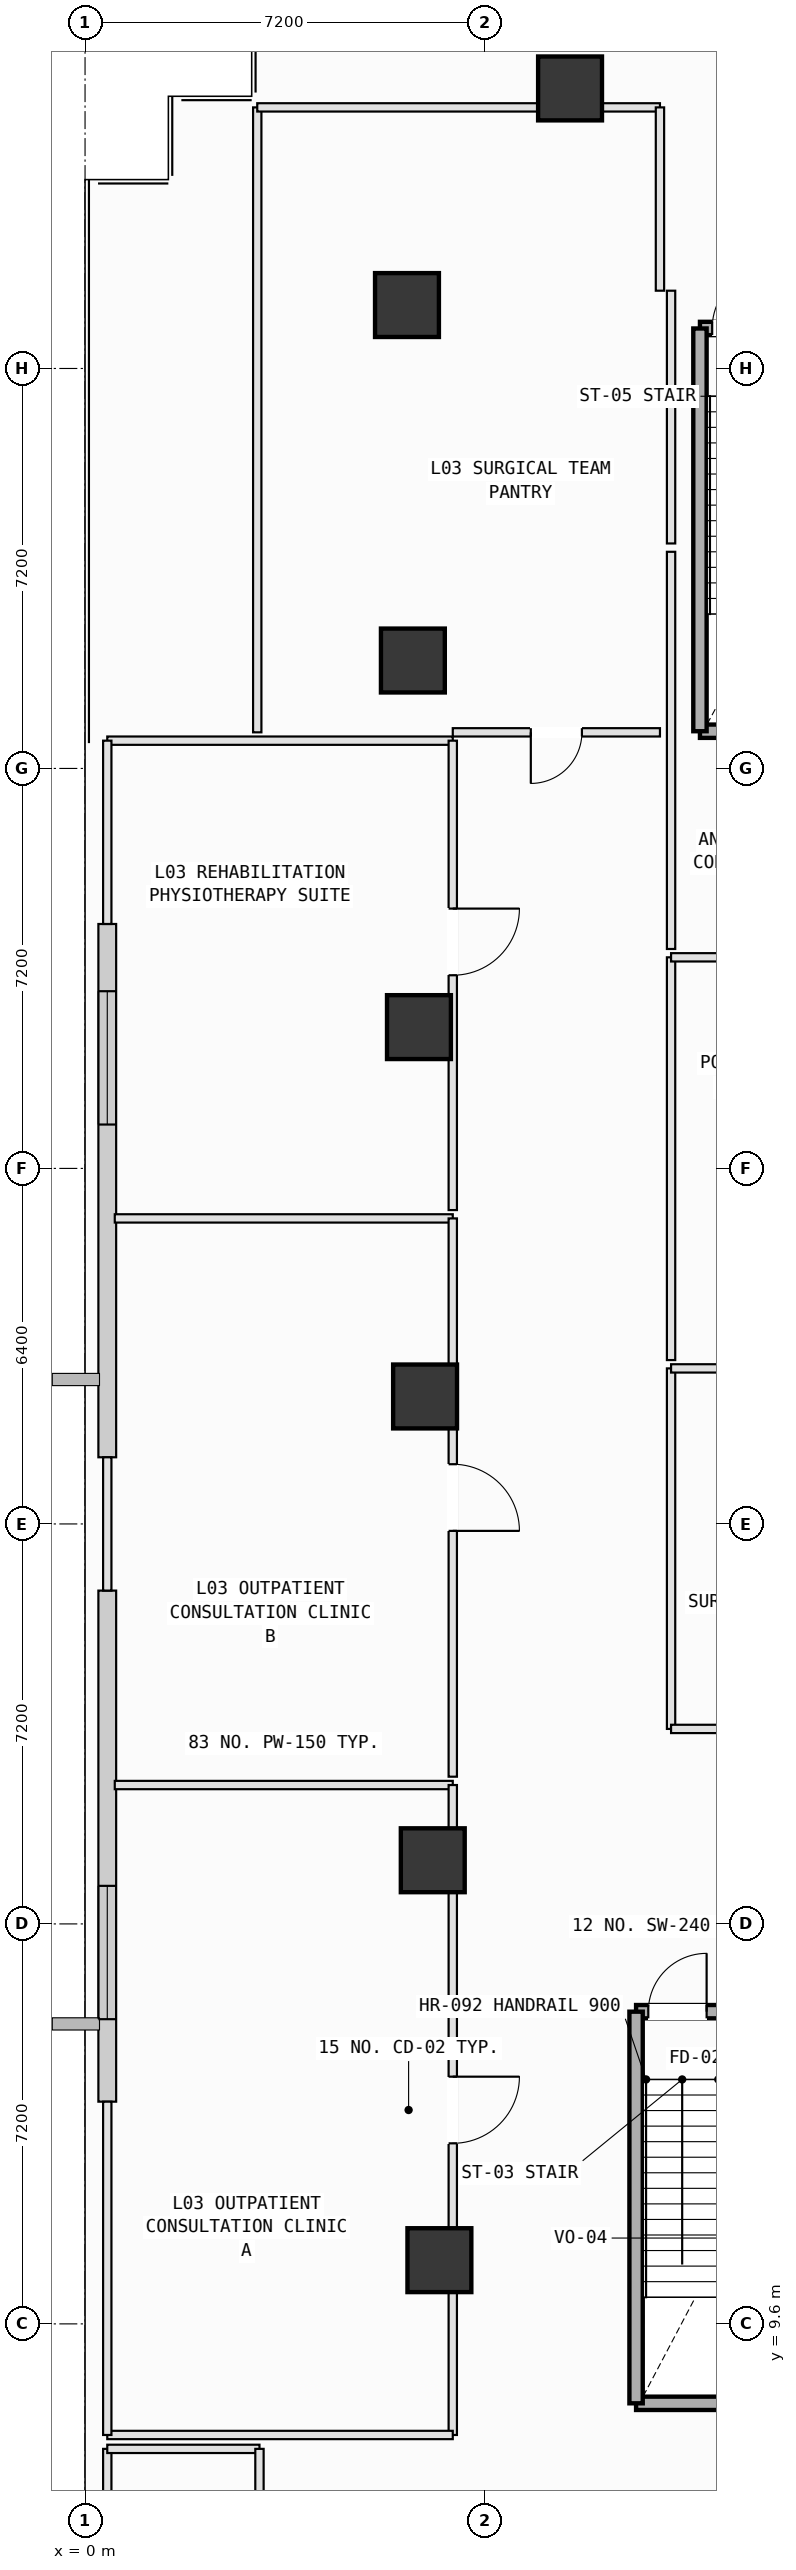
"""IFC4 building model, lengths in metres.
Left out: names, types, materials, properties, quantities, classifications, styles, units other than length and angle.
Written with IfcOpenShell. Run it as: python <this file> out.ifc"""

import sys

from ifc_helpers import new_model, si_unit, direction, frame, frame_2d, origin, origin_2d, place, context, subcontext, project, spatial, rectangle, extrude, element, fill, save


model = new_model("IFC4")
c1 = context("Model", 3, precision=1e-05, world=origin(), true_north=direction((0.0, 1.0)))
c2 = subcontext(c1, "Body", "Model", "MODEL_VIEW")
j1 = project(units=[si_unit("LENGTHUNIT", "METRE"), si_unit("PLANEANGLEUNIT", "RADIAN")], contexts=[c1])
p1 = place(None, origin())
s1 = spatial("IfcSite", under=j1, at=p1, CompositionType="ELEMENT")
p2 = place(p1, origin())
s2 = spatial("IfcBuilding", under=s1, at=p2, CompositionType="ELEMENT")
p3 = place(p2, frame((0.0, 0.0, 16.2)))
s3 = spatial("IfcBuildingStorey", under=s2, at=p3, CompositionType="ELEMENT", Elevation=16.2)
for number, where, z_axis, x_axis in (
    (1, (8.731, 49.841, 0.0), (0.0, 0.0, 1.0), (1.0, 0.0, 0.0)),
    (2, (5.796, 45.942, 0.0), (0.0, 0.0, 1.0), (1.0, 0.0, 0.0)),
    (3, (5.902, 39.543, 0.0), (0.0, 0.0, 1.0), (1.0, 0.0, 0.0)),
    (4, (6.011, 32.944, 0.0), (0.0, 0.0, 1.0), (1.0, 0.0, 0.0)),
    (5, (6.121, 26.295, 0.0), (0.0, 0.0, 1.0), (1.0, 0.0, 0.0)),
    (6, (6.26, 17.946, 0.0), (0.0, 0.0, 1.0), (1.0, 0.0, 0.0)),
    (7, (6.379, 10.747, 0.0), (0.0, 0.0, 1.0), (1.0, 0.0, 0.0)),
):
    element("IfcColumn", number, at=place(p3, frame(where, z_axis=z_axis, x_axis=x_axis)), inside=s3, PredefinedType="COLUMN", context=c2, shape_type="SweptSolid", body=[
        extrude(rectangle(XDim=1.15, YDim=1.15, at=origin_2d()), origin(), (0.0, 0.0, 1.0), 5.4),
    ])
p4 = place(p3, frame((0.4, 13.6, 0.0), z_axis=(0.0, 0.0, 1.0), x_axis=(0.0, 1.0, 0.0)))
e8 = element("IfcWall", 8, at=p4, inside=s3, PredefinedType="SOLIDWALL", context=c2, shape_type="SweptSolid", body=[
    extrude(rectangle(XDim=9.2, YDim=0.32, at=frame_2d((4.6, 0.0))), origin(), (0.0, 0.0, 1.0), 4.23),
])
p5 = place(p4, frame((1.485, 0.0, 0.8)))
e9 = element("IfcOpeningElement", 9, at=p5, cuts=e8, PredefinedType="OPENING", context=c2, shape_type="SweptSolid", body=[
    extrude(rectangle(XDim=2.4, YDim=2.2, at=frame_2d((1.2, 1.1))), frame((0.0, 0.17, 0.0), z_axis=(0.0, -1.0, 0.0), x_axis=(1.0, 0.0, 0.0)), (0.0, 0.0, 1.0), 0.34),
])
p6 = place(p3, frame((0.4, 25.2, 0.0), z_axis=(0.0, 0.0, 1.0), x_axis=(0.0, 1.0, 0.0)))
e10 = element("IfcWall", 10, at=p6, inside=s3, PredefinedType="SOLIDWALL", context=c2, shape_type="SweptSolid", body=[
    extrude(rectangle(XDim=9.6, YDim=0.32, at=frame_2d((4.8, 0.0))), origin(), (0.0, 0.0, 1.0), 4.23),
])
p7 = place(p6, frame((5.99, 0.0, 0.8)))
e11 = element("IfcOpeningElement", 11, at=p7, cuts=e10, PredefinedType="OPENING", context=c2, shape_type="SweptSolid", body=[
    extrude(rectangle(XDim=2.4, YDim=2.2, at=frame_2d((1.2, 1.1))), frame((0.0, 0.17, 0.0), z_axis=(0.0, -1.0, 0.0), x_axis=(1.0, 0.0, 0.0)), (0.0, 0.0, 1.0), 0.34),
])
p8 = place(p3, frame((9.92, 15.22, 0.0), z_axis=(0.0, 0.0, 1.0), x_axis=(1.0, 0.0, 0.0)))
e12 = element("IfcWall", 12, at=p8, inside=s3, PredefinedType="SOLIDWALL", context=c2, shape_type="SweptSolid", body=[
    extrude(rectangle(XDim=3.26, YDim=0.24, at=frame_2d((1.63, 0.0))), origin(), (0.0, 0.0, 1.0), 5.15),
])
p9 = place(p8, frame((0.22, 0.0, 0.0)))
e13 = element("IfcOpeningElement", 13, at=p9, cuts=e12, PredefinedType="OPENING", context=c2, shape_type="SweptSolid", body=[
    extrude(rectangle(XDim=1.05, YDim=2.15, at=frame_2d((0.525, 1.075))), frame((0.0, 0.13, 0.0), z_axis=(0.0, -1.0, 0.0), x_axis=(1.0, 0.0, 0.0)), (0.0, 0.0, 1.0), 0.26),
])
p10 = place(p3, frame((13.18, 8.17, 0.0), z_axis=(0.0, 0.0, 1.0), x_axis=(-1.0, 0.0, 0.0)))
e14 = element("IfcWall", 14, at=p10, inside=s3, PredefinedType="SOLIDWALL", context=c2, shape_type="SweptSolid", body=[
    extrude(rectangle(XDim=3.26, YDim=0.24, at=frame_2d((1.63, 0.0))), origin(), (0.0, 0.0, 1.0), 5.15),
])
p11 = place(p3, frame((9.92, 8.17, 0.0), z_axis=(0.0, 0.0, 1.0), x_axis=(0.0, 1.0, 0.0)))
e15 = element("IfcWall", 15, at=p11, inside=s3, PredefinedType="SOLIDWALL", context=c2, shape_type="SweptSolid", body=[
    extrude(rectangle(XDim=7.05, YDim=0.24, at=frame_2d((3.525, 0.0))), origin(), (0.0, 0.0, 1.0), 5.15),
])
p12 = place(p3, frame((11.07, 45.52, 0.0), z_axis=(0.0, 0.0, 1.0), x_axis=(1.0, 0.0, 0.0)))
e16 = element("IfcWall", 16, at=p12, inside=s3, PredefinedType="SOLIDWALL", context=c2, shape_type="SweptSolid", body=[
    extrude(rectangle(XDim=3.46, YDim=0.24, at=frame_2d((1.73, 0.0))), origin(), (0.0, 0.0, 1.0), 5.15),
])
p13 = place(p12, frame((0.22, 0.0, 0.0)))
e17 = element("IfcOpeningElement", 17, at=p13, cuts=e16, PredefinedType="OPENING", context=c2, shape_type="SweptSolid", body=[
    extrude(rectangle(XDim=1.1, YDim=2.15, at=frame_2d((0.55, 1.075))), frame((0.0, 0.13, 0.0), z_axis=(0.0, -1.0, 0.0), x_axis=(1.0, 0.0, 0.0)), (0.0, 0.0, 1.0), 0.26),
])
p14 = place(p3, frame((14.53, 38.27, 0.0), z_axis=(0.0, 0.0, 1.0), x_axis=(-1.0, 0.0, 0.0)))
e18 = element("IfcWall", 18, at=p14, inside=s3, PredefinedType="SOLIDWALL", context=c2, shape_type="SweptSolid", body=[
    extrude(rectangle(XDim=3.46, YDim=0.24, at=frame_2d((1.73, 0.0))), origin(), (0.0, 0.0, 1.0), 5.15),
])
p15 = place(p3, frame((11.07, 38.27, 0.0), z_axis=(0.0, 0.0, 1.0), x_axis=(0.0, 1.0, 0.0)))
e19 = element("IfcWall", 19, at=p15, inside=s3, PredefinedType="SOLIDWALL", context=c2, shape_type="SweptSolid", body=[
    extrude(rectangle(XDim=7.25, YDim=0.24, at=frame_2d((3.625, 0.0))), origin(), (0.0, 0.0, 1.0), 5.15),
])
p16 = place(p3, frame((0.535, 19.3, 0.0), z_axis=(0.0, 0.0, 1.0), x_axis=(1.0, 0.0, 0.0)))
e20 = element("IfcWall", 20, at=p16, inside=s3, PredefinedType="PARTITIONING", context=c2, shape_type="SweptSolid", body=[
    extrude(rectangle(XDim=6.085, YDim=0.15, at=frame_2d((3.042, 0.0))), origin(), (0.0, 0.0, 1.0), 5.15),
])
p17 = place(p3, frame((6.62, 19.3, 0.0), z_axis=(0.0, 0.0, 1.0), x_axis=(0.0, -1.0, 0.0)))
e21 = element("IfcWall", 21, at=p17, inside=s3, PredefinedType="PARTITIONING", context=c2, shape_type="SweptSolid", body=[
    extrude(rectangle(XDim=11.7, YDim=0.15, at=frame_2d((5.85, 0.0))), origin(), (0.0, 0.0, 1.0), 4.235),
])
p18 = place(p17, frame((5.25, 0.0, 0.0)))
e22 = element("IfcOpeningElement", 22, at=p18, cuts=e21, PredefinedType="OPENING", context=c2, shape_type="SweptSolid", body=[
    extrude(rectangle(XDim=1.2, YDim=2.15, at=frame_2d((0.6, 1.075))), frame((0.0, 0.085, 0.0), z_axis=(0.0, -1.0, 0.0), x_axis=(1.0, 0.0, 0.0)), (0.0, 0.0, 1.0), 0.17),
])
p19 = place(p3, frame((6.62, 7.6, 0.0), z_axis=(0.0, 0.0, 1.0), x_axis=(-1.0, 0.0, 0.0)))
e23 = element("IfcWall", 23, at=p19, inside=s3, PredefinedType="PARTITIONING", context=c2, shape_type="SweptSolid", body=[
    extrude(rectangle(XDim=6.22, YDim=0.15, at=frame_2d((3.11, 0.0))), origin(), (0.0, 0.0, 1.0), 5.15),
])
p20 = place(p3, frame((0.4, 7.6, 0.0), z_axis=(0.0, 0.0, 1.0), x_axis=(0.0, 1.0, 0.0)))
e24 = element("IfcWall", 24, at=p20, inside=s3, PredefinedType="PARTITIONING", context=c2, shape_type="SweptSolid", body=[
    extrude(rectangle(XDim=6.0, YDim=0.15, at=frame_2d((3.0, 0.0))), origin(), (0.0, 0.0, 1.0), 5.15),
])
p21 = place(p3, frame((0.535, 29.5, 0.0), z_axis=(0.0, 0.0, 1.0), x_axis=(1.0, 0.0, 0.0)))
e25 = element("IfcWall", 25, at=p21, inside=s3, PredefinedType="PARTITIONING", context=c2, shape_type="SweptSolid", body=[
    extrude(rectangle(XDim=6.085, YDim=0.15, at=frame_2d((3.042, 0.0))), origin(), (0.0, 0.0, 1.0), 5.15),
])
p22 = place(p3, frame((6.62, 29.5, 0.0), z_axis=(0.0, 0.0, 1.0), x_axis=(0.0, -1.0, 0.0)))
e26 = element("IfcWall", 26, at=p22, inside=s3, PredefinedType="PARTITIONING", context=c2, shape_type="SweptSolid", body=[
    extrude(rectangle(XDim=10.05, YDim=0.15, at=frame_2d((5.025, 0.0))), origin(), (0.0, 0.0, 1.0), 4.235),
])
p23 = place(p22, frame((4.425, 0.0, 0.0)))
e27 = element("IfcOpeningElement", 27, at=p23, cuts=e26, PredefinedType="OPENING", context=c2, shape_type="SweptSolid", body=[
    extrude(rectangle(XDim=1.2, YDim=2.15, at=frame_2d((0.6, 1.075))), frame((0.0, 0.085, 0.0), z_axis=(0.0, -1.0, 0.0), x_axis=(1.0, 0.0, 0.0)), (0.0, 0.0, 1.0), 0.17),
])
p24 = place(p3, frame((0.4, 22.8, 0.0), z_axis=(0.0, 0.0, 1.0), x_axis=(0.0, 1.0, 0.0)))
e28 = element("IfcWall", 28, at=p24, inside=s3, PredefinedType="PARTITIONING", context=c2, shape_type="SweptSolid", body=[
    extrude(rectangle(XDim=2.4, YDim=0.15, at=frame_2d((1.2, 0.0))), origin(), (0.0, 0.0, 1.0), 5.15),
])
p25 = place(p3, frame((0.4, 38.1, 0.0), z_axis=(0.0, 0.0, 1.0), x_axis=(1.0, 0.0, 0.0)))
e29 = element("IfcWall", 29, at=p25, inside=s3, PredefinedType="PARTITIONING", context=c2, shape_type="SweptSolid", body=[
    extrude(rectangle(XDim=6.22, YDim=0.15, at=frame_2d((3.11, 0.0))), origin(), (0.0, 0.0, 1.0), 5.15),
])
p26 = place(p3, frame((6.62, 38.1, 0.0), z_axis=(0.0, 0.0, 1.0), x_axis=(0.0, -1.0, 0.0)))
e30 = element("IfcWall", 30, at=p26, inside=s3, PredefinedType="PARTITIONING", context=c2, shape_type="SweptSolid", body=[
    extrude(rectangle(XDim=8.45, YDim=0.15, at=frame_2d((4.225, 0.0))), origin(), (0.0, 0.0, 1.0), 4.235),
])
p27 = place(p26, frame((3.023, 0.0, 0.0)))
e31 = element("IfcOpeningElement", 31, at=p27, cuts=e30, PredefinedType="OPENING", context=c2, shape_type="SweptSolid", body=[
    extrude(rectangle(XDim=1.2, YDim=2.15, at=frame_2d((0.6, 1.075))), frame((0.0, 0.085, 0.0), z_axis=(0.0, -1.0, 0.0), x_axis=(1.0, 0.0, 0.0)), (0.0, 0.0, 1.0), 0.17),
])
p28 = place(p3, frame((0.4, 34.8, 0.0), z_axis=(0.0, 0.0, 1.0), x_axis=(0.0, 1.0, 0.0)))
e32 = element("IfcWall", 32, at=p28, inside=s3, PredefinedType="PARTITIONING", context=c2, shape_type="SweptSolid", body=[
    extrude(rectangle(XDim=3.3, YDim=0.15, at=frame_2d((1.65, 0.0))), origin(), (0.0, 0.0, 1.0), 5.15),
])
p29 = place(p3, frame((0.4, 3.0, 0.0), z_axis=(0.0, 0.0, 1.0), x_axis=(0.0, 1.0, 0.0)))
e33 = element("IfcWall", 33, at=p29, inside=s3, PredefinedType="PARTITIONING", context=c2, shape_type="SweptSolid", body=[
    extrude(rectangle(XDim=4.35, YDim=0.15, at=frame_2d((2.175, 0.0))), origin(), (0.0, 0.0, 1.0), 5.15),
])
p30 = place(p3, frame((0.4, 7.35, 0.0), z_axis=(0.0, 0.0, 1.0), x_axis=(1.0, 0.0, 0.0)))
e34 = element("IfcWall", 34, at=p30, inside=s3, PredefinedType="PARTITIONING", context=c2, shape_type="SweptSolid", body=[
    extrude(rectangle(XDim=2.74, YDim=0.15, at=frame_2d((1.37, 0.0))), origin(), (0.0, 0.0, 1.0), 5.15),
])
p31 = place(p3, frame((3.14, 7.35, 0.0), z_axis=(0.0, 0.0, 1.0), x_axis=(0.0, -1.0, 0.0)))
e35 = element("IfcWall", 35, at=p31, inside=s3, PredefinedType="PARTITIONING", context=c2, shape_type="SweptSolid", body=[
    extrude(rectangle(XDim=2.256, YDim=0.15, at=frame_2d((1.128, 0.0))), origin(), (0.0, 0.0, 1.0), 5.15),
])
p32 = place(p3, frame((10.55, 20.31, 0.0), z_axis=(0.0, 0.0, 1.0), x_axis=(0.0, 1.0, 0.0)))
e36 = element("IfcWall", 36, at=p32, inside=s3, PredefinedType="PARTITIONING", context=c2, shape_type="SweptSolid", body=[
    extrude(rectangle(XDim=6.49, YDim=0.15, at=frame_2d((3.245, 0.0))), origin(), (0.0, 0.0, 1.0), 5.15),
])
for number, where, z_axis, x_axis in (
    (37, (10.55, 26.8, 0.0), (0.0, 0.0, 1.0), (1.0, 0.0, 0.0)),
    (38, (15.14, 20.31, 0.0), (0.0, 0.0, 1.0), (-1.0, 0.0, 0.0)),
):
    element("IfcWall", number, at=place(p3, frame(where, z_axis=z_axis, x_axis=x_axis)), inside=s3, PredefinedType="PARTITIONING", context=c2, shape_type="SweptSolid", body=[
        extrude(rectangle(XDim=4.59, YDim=0.15, at=frame_2d((2.295, 0.0))), origin(), (0.0, 0.0, 1.0), 5.15),
    ])
p33 = place(p3, frame((10.55, 26.95, 0.0), z_axis=(0.0, 0.0, 1.0), x_axis=(0.0, 1.0, 0.0)))
e39 = element("IfcWall", 39, at=p33, inside=s3, PredefinedType="PARTITIONING", context=c2, shape_type="SweptSolid", body=[
    extrude(rectangle(XDim=7.25, YDim=0.15, at=frame_2d((3.625, 0.0))), origin(), (0.0, 0.0, 1.0), 5.15),
])
p34 = place(p3, frame((10.55, 34.2, 0.0), z_axis=(0.0, 0.0, 1.0), x_axis=(1.0, 0.0, 0.0)))
e40 = element("IfcWall", 40, at=p34, inside=s3, PredefinedType="PARTITIONING", context=c2, shape_type="SweptSolid", body=[
    extrude(rectangle(XDim=4.59, YDim=0.15, at=frame_2d((2.295, 0.0))), origin(), (0.0, 0.0, 1.0), 5.15),
])
p35 = place(p3, frame((10.55, 34.35, 0.0), z_axis=(0.0, 0.0, 1.0), x_axis=(0.0, 1.0, 0.0)))
e41 = element("IfcWall", 41, at=p35, inside=s3, PredefinedType="PARTITIONING", context=c2, shape_type="SweptSolid", body=[
    extrude(rectangle(XDim=7.15, YDim=0.15, at=frame_2d((3.575, 0.0))), origin(), (0.0, 0.0, 1.0), 5.15),
])
p36 = place(p3, frame((10.55, 41.65, 0.0), z_axis=(0.0, 0.0, 1.0), x_axis=(0.0, 1.0, 0.0)))
e42 = element("IfcWall", 42, at=p36, inside=s3, PredefinedType="PARTITIONING", context=c2, shape_type="SweptSolid", body=[
    extrude(rectangle(XDim=4.55, YDim=0.15, at=frame_2d((2.275, 0.0))), origin(), (0.0, 0.0, 1.0), 5.15),
])
p37 = place(p3, frame((10.35, 38.25, 0.0), z_axis=(0.0, 0.0, 1.0), x_axis=(-1.0, 0.0, 0.0)))
e43 = element("IfcWall", 43, at=p37, inside=s3, PredefinedType="PARTITIONING", context=c2, shape_type="SweptSolid", body=[
    extrude(rectangle(XDim=3.73, YDim=0.15, at=frame_2d((1.865, 0.0))), origin(), (0.0, 0.0, 1.0), 5.15),
])
p38 = place(p37, frame((1.405, 0.0, 0.0)))
e44 = element("IfcOpeningElement", 44, at=p38, cuts=e43, PredefinedType="OPENING", context=c2, shape_type="SweptSolid", body=[
    extrude(rectangle(XDim=0.92, YDim=2.1, at=frame_2d((0.46, 1.05))), frame((0.0, 0.085, 0.0), z_axis=(0.0, -1.0, 0.0), x_axis=(1.0, 0.0, 0.0)), (0.0, 0.0, 1.0), 0.17),
])
p39 = place(p3, frame((3.1, 38.25, 0.0), z_axis=(0.0, 0.0, 1.0), x_axis=(0.0, 1.0, 0.0)))
e45 = element("IfcWall", 45, at=p39, inside=s3, PredefinedType="PARTITIONING", context=c2, shape_type="SweptSolid", body=[
    extrude(rectangle(XDim=11.25, YDim=0.15, at=frame_2d((5.625, 0.0))), origin(), (0.0, 0.0, 1.0), 5.15),
])
p40 = place(p3, frame((3.1, 49.5, 0.0), z_axis=(0.0, 0.0, 1.0), x_axis=(1.0, 0.0, 0.0)))
e46 = element("IfcWall", 46, at=p40, inside=s3, PredefinedType="PARTITIONING", context=c2, shape_type="SweptSolid", body=[
    extrude(rectangle(XDim=7.25, YDim=0.15, at=frame_2d((3.625, 0.0))), origin(), (0.0, 0.0, 1.0), 4.235),
])
p41 = place(p3, frame((10.35, 49.5, 0.0), z_axis=(0.0, 0.0, 1.0), x_axis=(0.0, -1.0, 0.0)))
e47 = element("IfcWall", 47, at=p41, inside=s3, PredefinedType="PARTITIONING", context=c2, shape_type="SweptSolid", body=[
    extrude(rectangle(XDim=3.3, YDim=0.15, at=frame_2d((1.65, 0.0))), origin(), (0.0, 0.0, 1.0), 5.15),
])
p42 = place(p5, origin())
e48 = element("IfcWindow", 48, at=p42, inside=s3, PartitioningType="SINGLE_PANEL", PredefinedType="WINDOW", context=c2, shape_type="SweptSolid", body=[
    extrude(rectangle(XDim=2.4, YDim=2.2, at=frame_2d((1.2, 1.1))), frame((0.0, 0.03, 0.0), z_axis=(0.0, -1.0, 0.0), x_axis=(1.0, 0.0, 0.0)), (0.0, 0.0, 1.0), 0.06),
])
fill(e9, e48)
p43 = place(p7, origin())
e49 = element("IfcWindow", 49, at=p43, inside=s3, PartitioningType="SINGLE_PANEL", PredefinedType="WINDOW", context=c2, shape_type="SweptSolid", body=[
    extrude(rectangle(XDim=2.4, YDim=2.2, at=frame_2d((1.2, 1.1))), frame((0.0, 0.03, 0.0), z_axis=(0.0, -1.0, 0.0), x_axis=(1.0, 0.0, 0.0)), (0.0, 0.0, 1.0), 0.06),
])
fill(e11, e49)
p44 = place(p9, origin())
e50 = element("IfcDoor", 50, at=p44, inside=s3, OperationType="SINGLE_SWING_RIGHT", PredefinedType="DOOR", context=c2, shape_type="SweptSolid", body=[
    extrude(rectangle(XDim=1.05, YDim=2.15, at=frame_2d((0.525, 1.075))), frame((0.0, 0.025, 0.0), z_axis=(0.0, -1.0, 0.0), x_axis=(1.0, 0.0, 0.0)), (0.0, 0.0, 1.0), 0.05),
])
fill(e13, e50)
p45 = place(p13, origin())
e51 = element("IfcDoor", 51, at=p45, inside=s3, OperationType="SINGLE_SWING_RIGHT", PredefinedType="DOOR", context=c2, shape_type="SweptSolid", body=[
    extrude(rectangle(XDim=1.1, YDim=2.15, at=frame_2d((0.55, 1.075))), frame((0.0, 0.025, 0.0), z_axis=(0.0, -1.0, 0.0), x_axis=(1.0, 0.0, 0.0)), (0.0, 0.0, 1.0), 0.05),
])
fill(e17, e51)
p46 = place(p18, origin())
e52 = element("IfcDoor", 52, at=p46, inside=s3, OperationType="SINGLE_SWING_LEFT", PredefinedType="DOOR", context=c2, shape_type="SweptSolid", body=[
    extrude(rectangle(XDim=1.2, YDim=2.15, at=frame_2d((0.6, 1.075))), frame((0.0, 0.025, 0.0), z_axis=(0.0, -1.0, 0.0), x_axis=(1.0, 0.0, 0.0)), (0.0, 0.0, 1.0), 0.05),
])
fill(e22, e52)
p47 = place(p23, origin())
e53 = element("IfcDoor", 53, at=p47, inside=s3, OperationType="SINGLE_SWING_RIGHT", PredefinedType="DOOR", context=c2, shape_type="SweptSolid", body=[
    extrude(rectangle(XDim=1.2, YDim=2.15, at=frame_2d((0.6, 1.075))), frame((0.0, 0.025, 0.0), z_axis=(0.0, -1.0, 0.0), x_axis=(1.0, 0.0, 0.0)), (0.0, 0.0, 1.0), 0.05),
])
fill(e27, e53)
p48 = place(p27, origin())
e54 = element("IfcDoor", 54, at=p48, inside=s3, OperationType="SINGLE_SWING_LEFT", PredefinedType="DOOR", context=c2, shape_type="SweptSolid", body=[
    extrude(rectangle(XDim=1.2, YDim=2.15, at=frame_2d((0.6, 1.075))), frame((0.0, 0.025, 0.0), z_axis=(0.0, -1.0, 0.0), x_axis=(1.0, 0.0, 0.0)), (0.0, 0.0, 1.0), 0.05),
])
fill(e31, e54)
p49 = place(p38, origin())
e55 = element("IfcDoor", 55, at=p49, inside=s3, OperationType="SINGLE_SWING_RIGHT", PredefinedType="DOOR", context=c2, shape_type="SweptSolid", body=[
    extrude(rectangle(XDim=0.92, YDim=2.1, at=frame_2d((0.46, 1.05))), frame((0.0, 0.025, 0.0), z_axis=(0.0, -1.0, 0.0), x_axis=(1.0, 0.0, 0.0)), (0.0, 0.0, 1.0), 0.05),
])
fill(e44, e55)
save(model, sys.argv[1])
